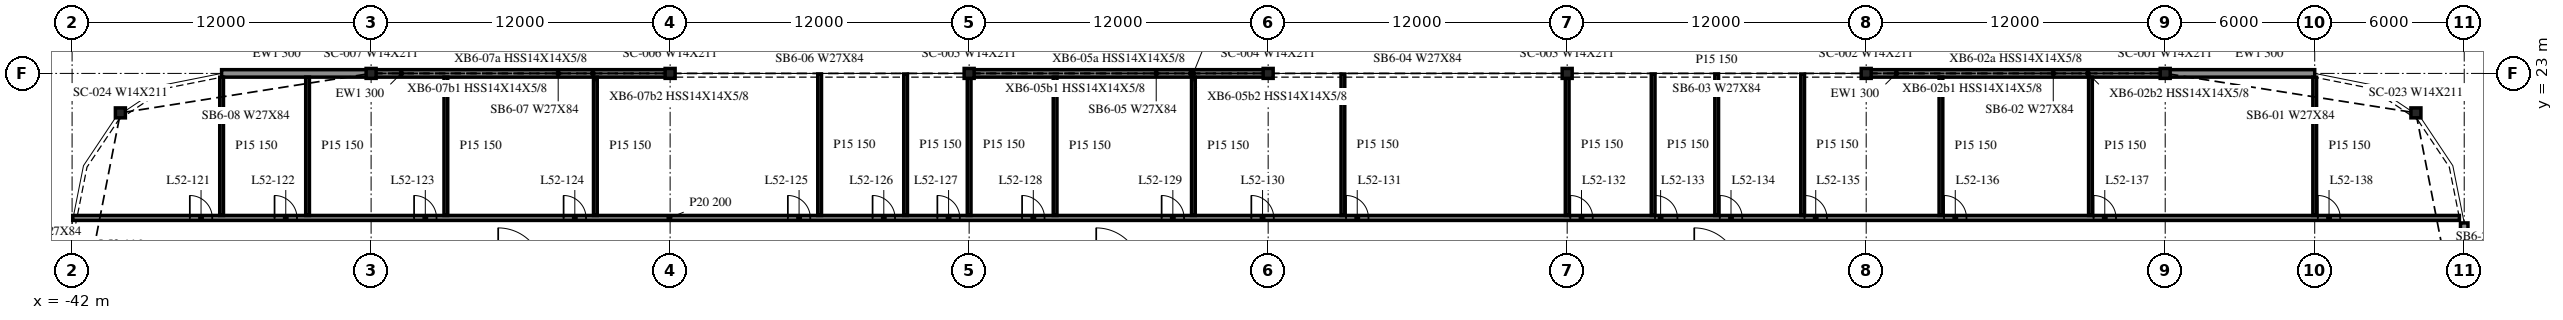
"""IFC4 building model, lengths in metres.
Left out: names, types, materials, properties, quantities, classifications, styles, units other than length and angle.
Written with IfcOpenShell. Run it as: python <this file> out.ifc"""

import sys

from ifc_helpers import new_model, si_unit, direction, frame, frame_2d, origin, origin_2d, place, context, subcontext, project, spatial, rectangle, i_section, extrude, element, fill, save


model = new_model("IFC4")
c1 = context("Model", 3, precision=1e-05, world=origin(), true_north=direction((0.0, 1.0)))
c2 = subcontext(c1, "Body", "Model", "MODEL_VIEW")
j1 = project(units=[si_unit("LENGTHUNIT", "METRE"), si_unit("PLANEANGLEUNIT", "RADIAN")], contexts=[c1])
p1 = place(None, origin())
s1 = spatial("IfcSite", under=j1, at=p1, CompositionType="ELEMENT")
p2 = place(p1, origin())
s2 = spatial("IfcBuilding", under=s1, at=p2, CompositionType="ELEMENT")
p3 = place(p2, frame((0.0, 0.0, 216.7)))
s3 = spatial("IfcBuildingStorey", under=s2, at=p3, CompositionType="ELEMENT", Elevation=216.7)
for number, where, z_axis, x_axis in (
    (1, (52.062, 21.416, -0.34), (0.0, 0.0, 1.0), (1.0, 0.0, 0.0)),
    (2, (42.0, 23.0, -0.34), (0.0, 0.0, 1.0), (1.0, 0.0, 0.0)),
    (3, (30.0, 23.0, -0.34), (0.0, 0.0, 1.0), (1.0, 0.0, 0.0)),
    (4, (18.0, 23.0, -0.34), (0.0, 0.0, 1.0), (1.0, 0.0, 0.0)),
    (5, (6.0, 23.0, -0.34), (0.0, 0.0, 1.0), (1.0, 0.0, 0.0)),
    (6, (-6.0, 23.0, -0.34), (0.0, 0.0, 1.0), (1.0, 0.0, 0.0)),
    (7, (-18.0, 23.0, -0.34), (0.0, 0.0, 1.0), (1.0, 0.0, 0.0)),
    (8, (-30.0, 23.0, -0.34), (0.0, 0.0, 1.0), (1.0, 0.0, 0.0)),
    (9, (-40.062, 21.416, -0.34), (0.0, 0.0, 1.0), (1.0, 0.0, 0.0)),
):
    element("IfcColumn", number, at=place(p3, frame(where, z_axis=z_axis, x_axis=x_axis)), inside=s3, PredefinedType="COLUMN", context=c2, shape_type="SweptSolid", body=[
        extrude(i_section(OverallWidth=0.401, OverallDepth=0.399, WebThickness=0.025, FlangeThickness=0.04, at=origin_2d()), origin(), (0.0, 0.0, 1.0), 3.8),
    ])
p4 = place(p3, frame((48.0, 23.0, 0.0), z_axis=(0.0, 0.0, 1.0), x_axis=(-1.0, 0.0, 0.0)))
e10 = element("IfcWall", 10, at=p4, inside=s3, PredefinedType="NOTDEFINED", context=c2, shape_type="SweptSolid", body=[
    extrude(rectangle(XDim=5.988, YDim=0.3, at=frame_2d((2.994, 0.0))), origin(), (0.0, 0.0, 1.0), 2.782),
])
for number, where, z_axis, x_axis in (
    (11, (41.988, 23.0, 0.0), (0.0, 0.0, 1.0), (-1.0, 0.0, 0.0)),
    (12, (5.988, 23.0, 0.0), (0.0, 0.0, 1.0), (-1.0, 0.0, 0.0)),
    (13, (-18.012, 23.0, 0.0), (0.0, 0.0, 1.0), (-1.0, 0.0, 0.0)),
):
    element("IfcWall", number, at=place(p3, frame(where, z_axis=z_axis, x_axis=x_axis)), inside=s3, PredefinedType="NOTDEFINED", context=c2, shape_type="SweptSolid", body=[
        extrude(rectangle(XDim=11.975, YDim=0.3, at=frame_2d((5.988, 0.0))), origin(), (0.0, 0.0, 1.0), 2.782),
    ])
p5 = place(p3, frame((-30.012, 23.0, 0.0), z_axis=(0.0, 0.0, 1.0), x_axis=(-1.0, 0.0, 0.0)))
e14 = element("IfcWall", 14, at=p5, inside=s3, PredefinedType="NOTDEFINED", context=c2, shape_type="SweptSolid", body=[
    extrude(rectangle(XDim=5.988, YDim=0.3, at=frame_2d((2.994, 0.0))), origin(), (0.0, 0.0, 1.0), 2.782),
])
p6 = place(p3, frame((54.0, 11.7, 0.0), z_axis=(0.0, 0.0, 1.0), x_axis=(0.0, 1.0, 0.0)))
e15 = element("IfcWall", 15, at=p6, inside=s3, PredefinedType="NOTDEFINED", context=c2, shape_type="SweptSolid", body=[
    extrude(rectangle(XDim=5.3, YDim=0.3, at=frame_2d((2.65, 0.0))), origin(), (0.0, 0.0, 1.0), 2.782),
])
p7 = place(p3, frame((-41.975, 17.2, 0.0), z_axis=(0.0, 0.0, 1.0), x_axis=(1.0, 0.0, 0.0)))
e16 = element("IfcWall", 16, at=p7, inside=s3, PredefinedType="PARTITIONING", context=c2, shape_type="SweptSolid", body=[
    extrude(rectangle(XDim=95.782, YDim=0.2, at=frame_2d((47.891, 0.0))), origin(), (0.0, 0.0, 1.0), 3.46),
])
p8 = place(p7, frame((4.7, 0.0, 0.0)))
e17 = element("IfcOpeningElement", 17, at=p8, cuts=e16, PredefinedType="OPENING", context=c2, shape_type="SweptSolid", body=[
    extrude(rectangle(XDim=0.9, YDim=2.1, at=frame_2d((0.45, 1.05))), frame((0.0, 0.11, 0.0), z_axis=(0.0, -1.0, 0.0), x_axis=(1.0, 0.0, 0.0)), (0.0, 0.0, 1.0), 0.22),
])
p9 = place(p7, frame((8.1, 0.0, 0.0)))
e18 = element("IfcOpeningElement", 18, at=p9, cuts=e16, PredefinedType="OPENING", context=c2, shape_type="SweptSolid", body=[
    extrude(rectangle(XDim=0.9, YDim=2.1, at=frame_2d((0.45, 1.05))), frame((0.0, 0.11, 0.0), z_axis=(0.0, -1.0, 0.0), x_axis=(1.0, 0.0, 0.0)), (0.0, 0.0, 1.0), 0.22),
])
p10 = place(p7, frame((13.7, 0.0, 0.0)))
e19 = element("IfcOpeningElement", 19, at=p10, cuts=e16, PredefinedType="OPENING", context=c2, shape_type="SweptSolid", body=[
    extrude(rectangle(XDim=0.9, YDim=2.1, at=frame_2d((0.45, 1.05))), frame((0.0, 0.11, 0.0), z_axis=(0.0, -1.0, 0.0), x_axis=(1.0, 0.0, 0.0)), (0.0, 0.0, 1.0), 0.22),
])
p11 = place(p7, frame((19.7, 0.0, 0.0)))
e20 = element("IfcOpeningElement", 20, at=p11, cuts=e16, PredefinedType="OPENING", context=c2, shape_type="SweptSolid", body=[
    extrude(rectangle(XDim=0.9, YDim=2.1, at=frame_2d((0.45, 1.05))), frame((0.0, 0.11, 0.0), z_axis=(0.0, -1.0, 0.0), x_axis=(1.0, 0.0, 0.0)), (0.0, 0.0, 1.0), 0.22),
])
p12 = place(p7, frame((28.7, 0.0, 0.0)))
e21 = element("IfcOpeningElement", 21, at=p12, cuts=e16, PredefinedType="OPENING", context=c2, shape_type="SweptSolid", body=[
    extrude(rectangle(XDim=0.9, YDim=2.1, at=frame_2d((0.45, 1.05))), frame((0.0, 0.11, 0.0), z_axis=(0.0, -1.0, 0.0), x_axis=(1.0, 0.0, 0.0)), (0.0, 0.0, 1.0), 0.22),
])
p13 = place(p7, frame((32.1, 0.0, 0.0)))
e22 = element("IfcOpeningElement", 22, at=p13, cuts=e16, PredefinedType="OPENING", context=c2, shape_type="SweptSolid", body=[
    extrude(rectangle(XDim=0.9, YDim=2.1, at=frame_2d((0.45, 1.05))), frame((0.0, 0.11, 0.0), z_axis=(0.0, -1.0, 0.0), x_axis=(1.0, 0.0, 0.0)), (0.0, 0.0, 1.0), 0.22),
])
p14 = place(p7, frame((34.7, 0.0, 0.0)))
e23 = element("IfcOpeningElement", 23, at=p14, cuts=e16, PredefinedType="OPENING", context=c2, shape_type="SweptSolid", body=[
    extrude(rectangle(XDim=0.9, YDim=2.1, at=frame_2d((0.45, 1.05))), frame((0.0, 0.11, 0.0), z_axis=(0.0, -1.0, 0.0), x_axis=(1.0, 0.0, 0.0)), (0.0, 0.0, 1.0), 0.22),
])
p15 = place(p7, frame((38.1, 0.0, 0.0)))
e24 = element("IfcOpeningElement", 24, at=p15, cuts=e16, PredefinedType="OPENING", context=c2, shape_type="SweptSolid", body=[
    extrude(rectangle(XDim=0.9, YDim=2.1, at=frame_2d((0.45, 1.05))), frame((0.0, 0.11, 0.0), z_axis=(0.0, -1.0, 0.0), x_axis=(1.0, 0.0, 0.0)), (0.0, 0.0, 1.0), 0.22),
])
p16 = place(p7, frame((43.7, 0.0, 0.0)))
e25 = element("IfcOpeningElement", 25, at=p16, cuts=e16, PredefinedType="OPENING", context=c2, shape_type="SweptSolid", body=[
    extrude(rectangle(XDim=0.9, YDim=2.1, at=frame_2d((0.45, 1.05))), frame((0.0, 0.11, 0.0), z_axis=(0.0, -1.0, 0.0), x_axis=(1.0, 0.0, 0.0)), (0.0, 0.0, 1.0), 0.22),
])
p17 = place(p7, frame((47.3, 0.0, 0.0)))
e26 = element("IfcOpeningElement", 26, at=p17, cuts=e16, PredefinedType="OPENING", context=c2, shape_type="SweptSolid", body=[
    extrude(rectangle(XDim=0.9, YDim=2.1, at=frame_2d((0.45, 1.05))), frame((0.0, 0.11, 0.0), z_axis=(0.0, -1.0, 0.0), x_axis=(1.0, 0.0, 0.0)), (0.0, 0.0, 1.0), 0.22),
])
p18 = place(p7, frame((51.1, 0.0, 0.0)))
e27 = element("IfcOpeningElement", 27, at=p18, cuts=e16, PredefinedType="OPENING", context=c2, shape_type="SweptSolid", body=[
    extrude(rectangle(XDim=0.9, YDim=2.1, at=frame_2d((0.45, 1.05))), frame((0.0, 0.11, 0.0), z_axis=(0.0, -1.0, 0.0), x_axis=(1.0, 0.0, 0.0)), (0.0, 0.0, 1.0), 0.22),
])
p19 = place(p7, frame((60.1, 0.0, 0.0)))
e28 = element("IfcOpeningElement", 28, at=p19, cuts=e16, PredefinedType="OPENING", context=c2, shape_type="SweptSolid", body=[
    extrude(rectangle(XDim=0.9, YDim=2.1, at=frame_2d((0.45, 1.05))), frame((0.0, 0.11, 0.0), z_axis=(0.0, -1.0, 0.0), x_axis=(1.0, 0.0, 0.0)), (0.0, 0.0, 1.0), 0.22),
])
p20 = place(p7, frame((63.5, 0.0, 0.0)))
e29 = element("IfcOpeningElement", 29, at=p20, cuts=e16, PredefinedType="OPENING", context=c2, shape_type="SweptSolid", body=[
    extrude(rectangle(XDim=0.9, YDim=2.1, at=frame_2d((0.45, 1.05))), frame((0.0, 0.11, 0.0), z_axis=(0.0, -1.0, 0.0), x_axis=(1.0, 0.0, 0.0)), (0.0, 0.0, 1.0), 0.22),
])
p21 = place(p7, frame((66.1, 0.0, 0.0)))
e30 = element("IfcOpeningElement", 30, at=p21, cuts=e16, PredefinedType="OPENING", context=c2, shape_type="SweptSolid", body=[
    extrude(rectangle(XDim=0.9, YDim=2.1, at=frame_2d((0.45, 1.05))), frame((0.0, 0.11, 0.0), z_axis=(0.0, -1.0, 0.0), x_axis=(1.0, 0.0, 0.0)), (0.0, 0.0, 1.0), 0.22),
])
p22 = place(p7, frame((69.5, 0.0, 0.0)))
e31 = element("IfcOpeningElement", 31, at=p22, cuts=e16, PredefinedType="OPENING", context=c2, shape_type="SweptSolid", body=[
    extrude(rectangle(XDim=0.9, YDim=2.1, at=frame_2d((0.45, 1.05))), frame((0.0, 0.11, 0.0), z_axis=(0.0, -1.0, 0.0), x_axis=(1.0, 0.0, 0.0)), (0.0, 0.0, 1.0), 0.22),
])
p23 = place(p7, frame((75.1, 0.0, 0.0)))
e32 = element("IfcOpeningElement", 32, at=p23, cuts=e16, PredefinedType="OPENING", context=c2, shape_type="SweptSolid", body=[
    extrude(rectangle(XDim=0.9, YDim=2.1, at=frame_2d((0.45, 1.05))), frame((0.0, 0.11, 0.0), z_axis=(0.0, -1.0, 0.0), x_axis=(1.0, 0.0, 0.0)), (0.0, 0.0, 1.0), 0.22),
])
p24 = place(p7, frame((81.1, 0.0, 0.0)))
e33 = element("IfcOpeningElement", 33, at=p24, cuts=e16, PredefinedType="OPENING", context=c2, shape_type="SweptSolid", body=[
    extrude(rectangle(XDim=0.9, YDim=2.1, at=frame_2d((0.45, 1.05))), frame((0.0, 0.11, 0.0), z_axis=(0.0, -1.0, 0.0), x_axis=(1.0, 0.0, 0.0)), (0.0, 0.0, 1.0), 0.22),
])
p25 = place(p7, frame((90.1, 0.0, 0.0)))
e34 = element("IfcOpeningElement", 34, at=p25, cuts=e16, PredefinedType="OPENING", context=c2, shape_type="SweptSolid", body=[
    extrude(rectangle(XDim=0.9, YDim=2.1, at=frame_2d((0.45, 1.05))), frame((0.0, 0.11, 0.0), z_axis=(0.0, -1.0, 0.0), x_axis=(1.0, 0.0, 0.0)), (0.0, 0.0, 1.0), 0.22),
])
p26 = place(p3, frame((-36.0, 17.3, 0.0), z_axis=(0.0, 0.0, 1.0), x_axis=(0.0, 1.0, 0.0)))
e35 = element("IfcWall", 35, at=p26, inside=s3, PredefinedType="PARTITIONING", context=c2, shape_type="SweptSolid", body=[
    extrude(rectangle(XDim=5.547, YDim=0.15, at=frame_2d((2.773, 0.0))), origin(), (0.0, 0.0, 1.0), 3.46),
])
for number, where, z_axis, x_axis in (
    (36, (-32.55, 17.3, 0.0), (0.0, 0.0, 1.0), (0.0, 1.0, 0.0)),
    (37, (-27.0, 17.3, 0.0), (0.0, 0.0, 1.0), (0.0, 1.0, 0.0)),
    (38, (-21.0, 17.3, 0.0), (0.0, 0.0, 1.0), (0.0, 1.0, 0.0)),
):
    element("IfcWall", number, at=place(p3, frame(where, z_axis=z_axis, x_axis=x_axis)), inside=s3, PredefinedType="PARTITIONING", context=c2, shape_type="SweptSolid", body=[
        extrude(rectangle(XDim=5.55, YDim=0.15, at=frame_2d((2.775, 0.0))), origin(), (0.0, 0.0, 1.0), 3.46),
    ])
for number, where, z_axis, x_axis in (
    (39, (-12.0, 17.3, 0.0), (0.0, 0.0, 1.0), (0.0, 1.0, 0.0)),
    (40, (-8.55, 17.3, 0.0), (0.0, 0.0, 1.0), (0.0, 1.0, 0.0)),
    (41, (-6.0, 17.3, 0.0), (0.0, 0.0, 1.0), (0.0, 1.0, 0.0)),
):
    element("IfcWall", number, at=place(p3, frame(where, z_axis=z_axis, x_axis=x_axis)), inside=s3, PredefinedType="PARTITIONING", context=c2, shape_type="SweptSolid", body=[
        extrude(rectangle(XDim=5.675, YDim=0.15, at=frame_2d((2.837, 0.0))), origin(), (0.0, 0.0, 1.0), 3.46),
    ])
for number, where, z_axis, x_axis in (
    (42, (-2.55, 17.3, 0.0), (0.0, 0.0, 1.0), (0.0, 1.0, 0.0)),
    (43, (3.0, 17.3, 0.0), (0.0, 0.0, 1.0), (0.0, 1.0, 0.0)),
):
    element("IfcWall", number, at=place(p3, frame(where, z_axis=z_axis, x_axis=x_axis)), inside=s3, PredefinedType="PARTITIONING", context=c2, shape_type="SweptSolid", body=[
        extrude(rectangle(XDim=5.55, YDim=0.15, at=frame_2d((2.775, 0.0))), origin(), (0.0, 0.0, 1.0), 3.46),
    ])
for number, where, z_axis, x_axis in (
    (44, (9.0, 17.3, 0.0), (0.0, 0.0, 1.0), (0.0, 1.0, 0.0)),
    (45, (18.0, 17.3, 0.0), (0.0, 0.0, 1.0), (0.0, 1.0, 0.0)),
    (46, (21.45, 17.3, 0.0), (0.0, 0.0, 1.0), (0.0, 1.0, 0.0)),
    (47, (24.0, 17.3, 0.0), (0.0, 0.0, 1.0), (0.0, 1.0, 0.0)),
    (48, (27.45, 17.3, 0.0), (0.0, 0.0, 1.0), (0.0, 1.0, 0.0)),
):
    element("IfcWall", number, at=place(p3, frame(where, z_axis=z_axis, x_axis=x_axis)), inside=s3, PredefinedType="PARTITIONING", context=c2, shape_type="SweptSolid", body=[
        extrude(rectangle(XDim=5.675, YDim=0.15, at=frame_2d((2.837, 0.0))), origin(), (0.0, 0.0, 1.0), 3.46),
    ])
for number, where, z_axis, x_axis in (
    (49, (33.0, 17.3, 0.0), (0.0, 0.0, 1.0), (0.0, 1.0, 0.0)),
    (50, (39.0, 17.3, 0.0), (0.0, 0.0, 1.0), (0.0, 1.0, 0.0)),
):
    element("IfcWall", number, at=place(p3, frame(where, z_axis=z_axis, x_axis=x_axis)), inside=s3, PredefinedType="PARTITIONING", context=c2, shape_type="SweptSolid", body=[
        extrude(rectangle(XDim=5.55, YDim=0.15, at=frame_2d((2.775, 0.0))), origin(), (0.0, 0.0, 1.0), 3.46),
    ])
p27 = place(p3, frame((48.0, 17.3, 0.0), z_axis=(0.0, 0.0, 1.0), x_axis=(0.0, 1.0, 0.0)))
e51 = element("IfcWall", 51, at=p27, inside=s3, PredefinedType="PARTITIONING", context=c2, shape_type="SweptSolid", body=[
    extrude(rectangle(XDim=5.547, YDim=0.15, at=frame_2d((2.773, 0.0))), origin(), (0.0, 0.0, 1.0), 3.46),
])
p28 = place(p8, origin())
e52 = element("IfcDoor", 52, at=p28, inside=s3, OperationType="SINGLE_SWING_LEFT", PredefinedType="DOOR", context=c2, shape_type="SweptSolid", body=[
    extrude(rectangle(XDim=0.9, YDim=2.1, at=frame_2d((0.45, 1.05))), frame((0.0, 0.025, 0.0), z_axis=(0.0, -1.0, 0.0), x_axis=(1.0, 0.0, 0.0)), (0.0, 0.0, 1.0), 0.05),
])
fill(e17, e52)
p29 = place(p9, origin())
e53 = element("IfcDoor", 53, at=p29, inside=s3, OperationType="SINGLE_SWING_LEFT", PredefinedType="DOOR", context=c2, shape_type="SweptSolid", body=[
    extrude(rectangle(XDim=0.9, YDim=2.1, at=frame_2d((0.45, 1.05))), frame((0.0, 0.025, 0.0), z_axis=(0.0, -1.0, 0.0), x_axis=(1.0, 0.0, 0.0)), (0.0, 0.0, 1.0), 0.05),
])
fill(e18, e53)
p30 = place(p10, origin())
e54 = element("IfcDoor", 54, at=p30, inside=s3, OperationType="SINGLE_SWING_LEFT", PredefinedType="DOOR", context=c2, shape_type="SweptSolid", body=[
    extrude(rectangle(XDim=0.9, YDim=2.1, at=frame_2d((0.45, 1.05))), frame((0.0, 0.025, 0.0), z_axis=(0.0, -1.0, 0.0), x_axis=(1.0, 0.0, 0.0)), (0.0, 0.0, 1.0), 0.05),
])
fill(e19, e54)
p31 = place(p11, origin())
e55 = element("IfcDoor", 55, at=p31, inside=s3, OperationType="SINGLE_SWING_LEFT", PredefinedType="DOOR", context=c2, shape_type="SweptSolid", body=[
    extrude(rectangle(XDim=0.9, YDim=2.1, at=frame_2d((0.45, 1.05))), frame((0.0, 0.025, 0.0), z_axis=(0.0, -1.0, 0.0), x_axis=(1.0, 0.0, 0.0)), (0.0, 0.0, 1.0), 0.05),
])
fill(e20, e55)
p32 = place(p12, origin())
e56 = element("IfcDoor", 56, at=p32, inside=s3, OperationType="SINGLE_SWING_LEFT", PredefinedType="DOOR", context=c2, shape_type="SweptSolid", body=[
    extrude(rectangle(XDim=0.9, YDim=2.1, at=frame_2d((0.45, 1.05))), frame((0.0, 0.025, 0.0), z_axis=(0.0, -1.0, 0.0), x_axis=(1.0, 0.0, 0.0)), (0.0, 0.0, 1.0), 0.05),
])
fill(e21, e56)
p33 = place(p13, origin())
e57 = element("IfcDoor", 57, at=p33, inside=s3, OperationType="SINGLE_SWING_LEFT", PredefinedType="DOOR", context=c2, shape_type="SweptSolid", body=[
    extrude(rectangle(XDim=0.9, YDim=2.1, at=frame_2d((0.45, 1.05))), frame((0.0, 0.025, 0.0), z_axis=(0.0, -1.0, 0.0), x_axis=(1.0, 0.0, 0.0)), (0.0, 0.0, 1.0), 0.05),
])
fill(e22, e57)
p34 = place(p14, origin())
e58 = element("IfcDoor", 58, at=p34, inside=s3, OperationType="SINGLE_SWING_LEFT", PredefinedType="DOOR", context=c2, shape_type="SweptSolid", body=[
    extrude(rectangle(XDim=0.9, YDim=2.1, at=frame_2d((0.45, 1.05))), frame((0.0, 0.025, 0.0), z_axis=(0.0, -1.0, 0.0), x_axis=(1.0, 0.0, 0.0)), (0.0, 0.0, 1.0), 0.05),
])
fill(e23, e58)
p35 = place(p15, origin())
e59 = element("IfcDoor", 59, at=p35, inside=s3, OperationType="SINGLE_SWING_LEFT", PredefinedType="DOOR", context=c2, shape_type="SweptSolid", body=[
    extrude(rectangle(XDim=0.9, YDim=2.1, at=frame_2d((0.45, 1.05))), frame((0.0, 0.025, 0.0), z_axis=(0.0, -1.0, 0.0), x_axis=(1.0, 0.0, 0.0)), (0.0, 0.0, 1.0), 0.05),
])
fill(e24, e59)
p36 = place(p16, origin())
e60 = element("IfcDoor", 60, at=p36, inside=s3, OperationType="SINGLE_SWING_LEFT", PredefinedType="DOOR", context=c2, shape_type="SweptSolid", body=[
    extrude(rectangle(XDim=0.9, YDim=2.1, at=frame_2d((0.45, 1.05))), frame((0.0, 0.025, 0.0), z_axis=(0.0, -1.0, 0.0), x_axis=(1.0, 0.0, 0.0)), (0.0, 0.0, 1.0), 0.05),
])
fill(e25, e60)
p37 = place(p17, origin())
e61 = element("IfcDoor", 61, at=p37, inside=s3, OperationType="SINGLE_SWING_LEFT", PredefinedType="DOOR", context=c2, shape_type="SweptSolid", body=[
    extrude(rectangle(XDim=0.9, YDim=2.1, at=frame_2d((0.45, 1.05))), frame((0.0, 0.025, 0.0), z_axis=(0.0, -1.0, 0.0), x_axis=(1.0, 0.0, 0.0)), (0.0, 0.0, 1.0), 0.05),
])
fill(e26, e61)
p38 = place(p18, origin())
e62 = element("IfcDoor", 62, at=p38, inside=s3, OperationType="SINGLE_SWING_RIGHT", PredefinedType="DOOR", context=c2, shape_type="SweptSolid", body=[
    extrude(rectangle(XDim=0.9, YDim=2.1, at=frame_2d((0.45, 1.05))), frame((0.0, 0.025, 0.0), z_axis=(0.0, -1.0, 0.0), x_axis=(1.0, 0.0, 0.0)), (0.0, 0.0, 1.0), 0.05),
])
fill(e27, e62)
p39 = place(p19, origin())
e63 = element("IfcDoor", 63, at=p39, inside=s3, OperationType="SINGLE_SWING_RIGHT", PredefinedType="DOOR", context=c2, shape_type="SweptSolid", body=[
    extrude(rectangle(XDim=0.9, YDim=2.1, at=frame_2d((0.45, 1.05))), frame((0.0, 0.025, 0.0), z_axis=(0.0, -1.0, 0.0), x_axis=(1.0, 0.0, 0.0)), (0.0, 0.0, 1.0), 0.05),
])
fill(e28, e63)
p40 = place(p20, origin())
e64 = element("IfcDoor", 64, at=p40, inside=s3, OperationType="SINGLE_SWING_RIGHT", PredefinedType="DOOR", context=c2, shape_type="SweptSolid", body=[
    extrude(rectangle(XDim=0.9, YDim=2.1, at=frame_2d((0.45, 1.05))), frame((0.0, 0.025, 0.0), z_axis=(0.0, -1.0, 0.0), x_axis=(1.0, 0.0, 0.0)), (0.0, 0.0, 1.0), 0.05),
])
fill(e29, e64)
p41 = place(p21, origin())
e65 = element("IfcDoor", 65, at=p41, inside=s3, OperationType="SINGLE_SWING_RIGHT", PredefinedType="DOOR", context=c2, shape_type="SweptSolid", body=[
    extrude(rectangle(XDim=0.9, YDim=2.1, at=frame_2d((0.45, 1.05))), frame((0.0, 0.025, 0.0), z_axis=(0.0, -1.0, 0.0), x_axis=(1.0, 0.0, 0.0)), (0.0, 0.0, 1.0), 0.05),
])
fill(e30, e65)
p42 = place(p22, origin())
e66 = element("IfcDoor", 66, at=p42, inside=s3, OperationType="SINGLE_SWING_RIGHT", PredefinedType="DOOR", context=c2, shape_type="SweptSolid", body=[
    extrude(rectangle(XDim=0.9, YDim=2.1, at=frame_2d((0.45, 1.05))), frame((0.0, 0.025, 0.0), z_axis=(0.0, -1.0, 0.0), x_axis=(1.0, 0.0, 0.0)), (0.0, 0.0, 1.0), 0.05),
])
fill(e31, e66)
p43 = place(p23, origin())
e67 = element("IfcDoor", 67, at=p43, inside=s3, OperationType="SINGLE_SWING_RIGHT", PredefinedType="DOOR", context=c2, shape_type="SweptSolid", body=[
    extrude(rectangle(XDim=0.9, YDim=2.1, at=frame_2d((0.45, 1.05))), frame((0.0, 0.025, 0.0), z_axis=(0.0, -1.0, 0.0), x_axis=(1.0, 0.0, 0.0)), (0.0, 0.0, 1.0), 0.05),
])
fill(e32, e67)
p44 = place(p24, origin())
e68 = element("IfcDoor", 68, at=p44, inside=s3, OperationType="SINGLE_SWING_RIGHT", PredefinedType="DOOR", context=c2, shape_type="SweptSolid", body=[
    extrude(rectangle(XDim=0.9, YDim=2.1, at=frame_2d((0.45, 1.05))), frame((0.0, 0.025, 0.0), z_axis=(0.0, -1.0, 0.0), x_axis=(1.0, 0.0, 0.0)), (0.0, 0.0, 1.0), 0.05),
])
fill(e33, e68)
p45 = place(p25, origin())
e69 = element("IfcDoor", 69, at=p45, inside=s3, OperationType="SINGLE_SWING_RIGHT", PredefinedType="DOOR", context=c2, shape_type="SweptSolid", body=[
    extrude(rectangle(XDim=0.9, YDim=2.1, at=frame_2d((0.45, 1.05))), frame((0.0, 0.025, 0.0), z_axis=(0.0, -1.0, 0.0), x_axis=(1.0, 0.0, 0.0)), (0.0, 0.0, 1.0), 0.05),
])
fill(e34, e69)
save(model, sys.argv[1])
